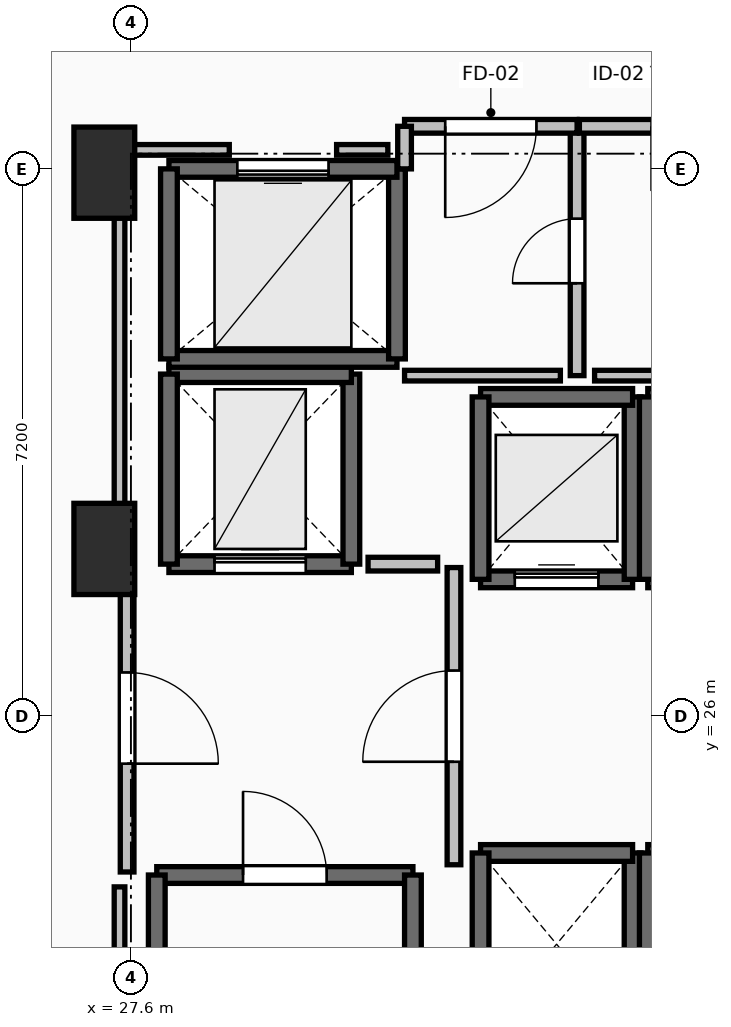
"""IFC4 building model, lengths in metres.
Left out: names, types, materials, properties, quantities, classifications, styles, units other than length and angle.
Written with IfcOpenShell. Run it as: python <this file> out.ifc"""

import sys

from ifc_helpers import new_model, si_unit, direction, frame, frame_2d, origin, origin_2d, place, context, subcontext, project, spatial, rectangle, extrude, element, fill, save


model = new_model("IFC4")
c1 = context("Model", 3, precision=1e-05, world=origin(), true_north=direction((0.0, 1.0)))
c2 = subcontext(c1, "Body", "Model", "MODEL_VIEW")
j1 = project(units=[si_unit("LENGTHUNIT", "METRE"), si_unit("PLANEANGLEUNIT", "RADIAN")], contexts=[c1])
p1 = place(None, origin())
s1 = spatial("IfcSite", under=j1, at=p1, CompositionType="ELEMENT")
p2 = place(p1, origin())
s2 = spatial("IfcBuilding", under=s1, at=p2, CompositionType="ELEMENT")
p3 = place(p2, frame((0.0, 0.0, 52.0)))
s3 = spatial("IfcBuildingStorey", under=s2, at=p3, CompositionType="ELEMENT", Elevation=52.0)
for number, where, z_axis, x_axis in (
    (1, (27.25, 28.2, 0.0), (0.0, 0.0, 1.0), (1.0, 0.0, 0.0)),
    (2, (27.25, 33.15, 0.0), (0.0, 0.0, 1.0), (1.0, 0.0, 0.0)),
):
    element("IfcColumn", number, at=place(p3, frame(where, z_axis=z_axis, x_axis=x_axis)), inside=s3, PredefinedType="PILASTER", context=c2, shape_type="SweptSolid", body=[
        extrude(rectangle(XDim=0.8, YDim=1.2, at=origin_2d()), origin(), (0.0, 0.0, 1.0), 3.5),
    ])
p4 = place(p3, frame((27.94, 23.91, 0.0), z_axis=(0.0, 0.0, 1.0), x_axis=(1.0, 0.0, 0.0)))
e3 = element("IfcWall", 3, at=p4, inside=s3, PredefinedType="SOLIDWALL", context=c2, shape_type="SweptSolid", body=[
    extrude(rectangle(XDim=3.37, YDim=0.22, at=frame_2d((1.685, 0.0))), origin(), (0.0, 0.0, 1.0), 3.24),
])
p5 = place(p4, frame((1.135, 0.0, 0.0)))
e4 = element("IfcOpeningElement", 4, at=p5, cuts=e3, PredefinedType="OPENING", context=c2, shape_type="SweptSolid", body=[
    extrude(rectangle(XDim=1.1, YDim=2.15, at=frame_2d((0.55, 1.075))), frame((0.0, 0.125, 0.0), z_axis=(0.0, -1.0, 0.0), x_axis=(1.0, 0.0, 0.0)), (0.0, 0.0, 1.0), 0.25),
])
for number, where, z_axis, x_axis in (
    (5, (31.31, 23.91, 0.0), (0.0, 0.0, 1.0), (0.0, -1.0, 0.0)),
    (6, (27.94, 16.49, 0.0), (0.0, 0.0, 1.0), (0.0, 1.0, 0.0)),
):
    element("IfcWall", number, at=place(p3, frame(where, z_axis=z_axis, x_axis=x_axis)), inside=s3, PredefinedType="SOLIDWALL", context=c2, shape_type="SweptSolid", body=[
        extrude(rectangle(XDim=7.42, YDim=0.22, at=frame_2d((3.71, 0.0))), origin(), (0.0, 0.0, 1.0), 3.24),
    ])
p6 = place(p3, frame((32.2, 27.8, 0.0), z_axis=(0.0, 0.0, 1.0), x_axis=(1.0, 0.0, 0.0)))
e7 = element("IfcWall", 7, at=p6, inside=s3, PredefinedType="SOLIDWALL", context=c2, shape_type="SweptSolid", body=[
    extrude(rectangle(XDim=2.0, YDim=0.22, at=frame_2d((1.0, 0.0))), origin(), (0.0, 0.0, 1.0), 3.24),
])
p7 = place(p6, frame((0.45, 0.0, 0.0)))
e8 = element("IfcOpeningElement", 8, at=p7, cuts=e7, PredefinedType="OPENING", context=c2, shape_type="SweptSolid", body=[
    extrude(rectangle(XDim=1.1, YDim=2.2, at=frame_2d((0.55, 1.1))), frame((0.0, 0.125, 0.0), z_axis=(0.0, -1.0, 0.0), x_axis=(1.0, 0.0, 0.0)), (0.0, 0.0, 1.0), 0.25),
])
p8 = place(p3, frame((34.2, 27.8, 0.0), z_axis=(0.0, 0.0, 1.0), x_axis=(0.0, 1.0, 0.0)))
e9 = element("IfcWall", 9, at=p8, inside=s3, PredefinedType="SOLIDWALL", context=c2, shape_type="SweptSolid", body=[
    extrude(rectangle(XDim=2.4, YDim=0.22, at=frame_2d((1.2, 0.0))), origin(), (0.0, 0.0, 1.0), 3.24),
])
p9 = place(p3, frame((34.2, 30.2, 0.0), z_axis=(0.0, 0.0, 1.0), x_axis=(-1.0, 0.0, 0.0)))
e10 = element("IfcWall", 10, at=p9, inside=s3, PredefinedType="SOLIDWALL", context=c2, shape_type="SweptSolid", body=[
    extrude(rectangle(XDim=2.0, YDim=0.22, at=frame_2d((1.0, 0.0))), origin(), (0.0, 0.0, 1.0), 3.24),
])
p10 = place(p3, frame((32.2, 30.2, 0.0), z_axis=(0.0, 0.0, 1.0), x_axis=(0.0, -1.0, 0.0)))
e11 = element("IfcWall", 11, at=p10, inside=s3, PredefinedType="SOLIDWALL", context=c2, shape_type="SweptSolid", body=[
    extrude(rectangle(XDim=2.4, YDim=0.22, at=frame_2d((1.2, 0.0))), origin(), (0.0, 0.0, 1.0), 3.24),
])
p11 = place(p3, frame((34.4, 27.8, 0.0), z_axis=(0.0, 0.0, 1.0), x_axis=(1.0, 0.0, 0.0)))
e12 = element("IfcWall", 12, at=p11, inside=s3, PredefinedType="SOLIDWALL", context=c2, shape_type="SweptSolid", body=[
    extrude(rectangle(XDim=2.0, YDim=0.22, at=frame_2d((1.0, 0.0))), origin(), (0.0, 0.0, 1.0), 3.24),
])
p12 = place(p11, frame((0.45, 0.0, 0.0)))
e13 = element("IfcOpeningElement", 13, at=p12, cuts=e12, PredefinedType="OPENING", context=c2, shape_type="SweptSolid", body=[
    extrude(rectangle(XDim=1.1, YDim=2.2, at=frame_2d((0.55, 1.1))), frame((0.0, 0.125, 0.0), z_axis=(0.0, -1.0, 0.0), x_axis=(1.0, 0.0, 0.0)), (0.0, 0.0, 1.0), 0.25),
])
p13 = place(p3, frame((36.4, 30.2, 0.0), z_axis=(0.0, 0.0, 1.0), x_axis=(-1.0, 0.0, 0.0)))
e14 = element("IfcWall", 14, at=p13, inside=s3, PredefinedType="SOLIDWALL", context=c2, shape_type="SweptSolid", body=[
    extrude(rectangle(XDim=2.0, YDim=0.22, at=frame_2d((1.0, 0.0))), origin(), (0.0, 0.0, 1.0), 3.24),
])
for number, where, z_axis, x_axis in (
    (15, (34.4, 30.2, 0.0), (0.0, 0.0, 1.0), (0.0, -1.0, 0.0)),
    (16, (34.2, 21.8, 0.0), (0.0, 0.0, 1.0), (0.0, 1.0, 0.0)),
):
    element("IfcWall", number, at=place(p3, frame(where, z_axis=z_axis, x_axis=x_axis)), inside=s3, PredefinedType="SOLIDWALL", context=c2, shape_type="SweptSolid", body=[
        extrude(rectangle(XDim=2.4, YDim=0.22, at=frame_2d((1.2, 0.0))), origin(), (0.0, 0.0, 1.0), 3.24),
    ])
p14 = place(p3, frame((34.2, 24.2, 0.0), z_axis=(0.0, 0.0, 1.0), x_axis=(-1.0, 0.0, 0.0)))
e17 = element("IfcWall", 17, at=p14, inside=s3, PredefinedType="SOLIDWALL", context=c2, shape_type="SweptSolid", body=[
    extrude(rectangle(XDim=2.0, YDim=0.22, at=frame_2d((1.0, 0.0))), origin(), (0.0, 0.0, 1.0), 3.24),
])
p15 = place(p3, frame((32.2, 24.2, 0.0), z_axis=(0.0, 0.0, 1.0), x_axis=(0.0, -1.0, 0.0)))
e18 = element("IfcWall", 18, at=p15, inside=s3, PredefinedType="SOLIDWALL", context=c2, shape_type="SweptSolid", body=[
    extrude(rectangle(XDim=2.4, YDim=0.22, at=frame_2d((1.2, 0.0))), origin(), (0.0, 0.0, 1.0), 3.24),
])
p16 = place(p3, frame((36.4, 24.2, 0.0), z_axis=(0.0, 0.0, 1.0), x_axis=(-1.0, 0.0, 0.0)))
e19 = element("IfcWall", 19, at=p16, inside=s3, PredefinedType="SOLIDWALL", context=c2, shape_type="SweptSolid", body=[
    extrude(rectangle(XDim=2.0, YDim=0.22, at=frame_2d((1.0, 0.0))), origin(), (0.0, 0.0, 1.0), 3.24),
])
p17 = place(p3, frame((34.4, 24.2, 0.0), z_axis=(0.0, 0.0, 1.0), x_axis=(0.0, -1.0, 0.0)))
e20 = element("IfcWall", 20, at=p17, inside=s3, PredefinedType="SOLIDWALL", context=c2, shape_type="SweptSolid", body=[
    extrude(rectangle(XDim=2.4, YDim=0.22, at=frame_2d((1.2, 0.0))), origin(), (0.0, 0.0, 1.0), 3.24),
])
p18 = place(p3, frame((28.1, 28.0, 0.0), z_axis=(0.0, 0.0, 1.0), x_axis=(1.0, 0.0, 0.0)))
e21 = element("IfcWall", 21, at=p18, inside=s3, PredefinedType="SHEAR", context=c2, shape_type="SweptSolid", body=[
    extrude(rectangle(XDim=2.4, YDim=0.22, at=frame_2d((1.2, 0.0))), origin(), (0.0, 0.0, 1.0), 3.24),
])
p19 = place(p18, frame((0.6, 0.0, 0.0)))
e22 = element("IfcOpeningElement", 22, at=p19, cuts=e21, PredefinedType="OPENING", context=c2, shape_type="SweptSolid", body=[
    extrude(rectangle(XDim=1.2, YDim=2.2, at=frame_2d((0.6, 1.1))), frame((0.0, 0.125, 0.0), z_axis=(0.0, -1.0, 0.0), x_axis=(1.0, 0.0, 0.0)), (0.0, 0.0, 1.0), 0.25),
])
p20 = place(p3, frame((30.5, 28.0, 0.0), z_axis=(0.0, 0.0, 1.0), x_axis=(0.0, 1.0, 0.0)))
e23 = element("IfcWall", 23, at=p20, inside=s3, PredefinedType="SHEAR", context=c2, shape_type="SweptSolid", body=[
    extrude(rectangle(XDim=2.5, YDim=0.22, at=frame_2d((1.25, 0.0))), origin(), (0.0, 0.0, 1.0), 3.24),
])
p21 = place(p3, frame((30.5, 30.5, 0.0), z_axis=(0.0, 0.0, 1.0), x_axis=(-1.0, 0.0, 0.0)))
e24 = element("IfcWall", 24, at=p21, inside=s3, PredefinedType="SHEAR", context=c2, shape_type="SweptSolid", body=[
    extrude(rectangle(XDim=2.4, YDim=0.22, at=frame_2d((1.2, 0.0))), origin(), (0.0, 0.0, 1.0), 3.24),
])
p22 = place(p3, frame((28.1, 30.5, 0.0), z_axis=(0.0, 0.0, 1.0), x_axis=(0.0, -1.0, 0.0)))
e25 = element("IfcWall", 25, at=p22, inside=s3, PredefinedType="SHEAR", context=c2, shape_type="SweptSolid", body=[
    extrude(rectangle(XDim=2.5, YDim=0.22, at=frame_2d((1.25, 0.0))), origin(), (0.0, 0.0, 1.0), 3.24),
])
p23 = place(p3, frame((28.1, 30.7, 0.0), z_axis=(0.0, 0.0, 1.0), x_axis=(1.0, 0.0, 0.0)))
e26 = element("IfcWall", 26, at=p23, inside=s3, PredefinedType="SOLIDWALL", context=c2, shape_type="SweptSolid", body=[
    extrude(rectangle(XDim=3.0, YDim=0.22, at=frame_2d((1.5, 0.0))), origin(), (0.0, 0.0, 1.0), 3.24),
])
p24 = place(p3, frame((31.1, 30.7, 0.0), z_axis=(0.0, 0.0, 1.0), x_axis=(0.0, 1.0, 0.0)))
e27 = element("IfcWall", 27, at=p24, inside=s3, PredefinedType="SOLIDWALL", context=c2, shape_type="SweptSolid", body=[
    extrude(rectangle(XDim=2.5, YDim=0.22, at=frame_2d((1.25, 0.0))), origin(), (0.0, 0.0, 1.0), 3.24),
])
p25 = place(p3, frame((31.1, 33.2, 0.0), z_axis=(0.0, 0.0, 1.0), x_axis=(-1.0, 0.0, 0.0)))
e28 = element("IfcWall", 28, at=p25, inside=s3, PredefinedType="SOLIDWALL", context=c2, shape_type="SweptSolid", body=[
    extrude(rectangle(XDim=3.0, YDim=0.22, at=frame_2d((1.5, 0.0))), origin(), (0.0, 0.0, 1.0), 3.24),
])
p26 = place(p25, frame((0.9, 0.0, 0.0)))
e29 = element("IfcOpeningElement", 29, at=p26, cuts=e28, PredefinedType="OPENING", context=c2, shape_type="SweptSolid", body=[
    extrude(rectangle(XDim=1.2, YDim=2.2, at=frame_2d((0.6, 1.1))), frame((0.0, 0.125, 0.0), z_axis=(0.0, -1.0, 0.0), x_axis=(1.0, 0.0, 0.0)), (0.0, 0.0, 1.0), 0.25),
])
p27 = place(p3, frame((28.1, 33.2, 0.0), z_axis=(0.0, 0.0, 1.0), x_axis=(0.0, -1.0, 0.0)))
e30 = element("IfcWall", 30, at=p27, inside=s3, PredefinedType="SOLIDWALL", context=c2, shape_type="SweptSolid", body=[
    extrude(rectangle(XDim=2.5, YDim=0.22, at=frame_2d((1.25, 0.0))), origin(), (0.0, 0.0, 1.0), 3.24),
])
p28 = place(p3, frame((31.85, 24.045, 0.0), z_axis=(0.0, 0.0, 1.0), x_axis=(0.0, 1.0, 0.0)))
e31 = element("IfcWall", 31, at=p28, inside=s3, PredefinedType="PARTITIONING", context=c2, shape_type="SweptSolid", body=[
    extrude(rectangle(XDim=3.91, YDim=0.18, at=frame_2d((1.955, 0.0))), origin(), (0.0, 0.0, 1.0), 3.24),
])
p29 = place(p28, frame((1.355, 0.0, 0.0)))
e32 = element("IfcOpeningElement", 32, at=p29, cuts=e31, PredefinedType="OPENING", context=c2, shape_type="SweptSolid", body=[
    extrude(rectangle(XDim=1.2, YDim=2.15, at=frame_2d((0.6, 1.075))), frame((0.0, 0.105, 0.0), z_axis=(0.0, -1.0, 0.0), x_axis=(1.0, 0.0, 0.0)), (0.0, 0.0, 1.0), 0.21),
])
p30 = place(p3, frame((27.55, 28.0, 0.0), z_axis=(0.0, 0.0, 1.0), x_axis=(0.0, -1.0, 0.0)))
e33 = element("IfcWall", 33, at=p30, inside=s3, PredefinedType="PARTITIONING", context=c2, shape_type="SweptSolid", body=[
    extrude(rectangle(XDim=4.05, YDim=0.18, at=frame_2d((2.025, 0.0))), origin(), (0.0, 0.0, 1.0), 3.24),
])
p31 = place(p30, frame((1.425, 0.0, 0.0)))
e34 = element("IfcOpeningElement", 34, at=p31, cuts=e33, PredefinedType="OPENING", context=c2, shape_type="SweptSolid", body=[
    extrude(rectangle(XDim=1.2, YDim=2.15, at=frame_2d((0.6, 1.075))), frame((0.0, 0.105, 0.0), z_axis=(0.0, -1.0, 0.0), x_axis=(1.0, 0.0, 0.0)), (0.0, 0.0, 1.0), 0.21),
])
p32 = place(p3, frame((33.47, 30.48, 0.0), z_axis=(0.0, 0.0, 1.0), x_axis=(0.0, 1.0, 0.0)))
e35 = element("IfcWall", 35, at=p32, inside=s3, PredefinedType="PARTITIONING", context=c2, shape_type="SweptSolid", body=[
    extrude(rectangle(XDim=3.28, YDim=0.18, at=frame_2d((1.64, 0.0))), origin(), (0.0, 0.0, 1.0), 3.24),
])
p33 = place(p32, frame((1.215, 0.0, 0.0)))
e36 = element("IfcOpeningElement", 36, at=p33, cuts=e35, PredefinedType="OPENING", context=c2, shape_type="SweptSolid", body=[
    extrude(rectangle(XDim=0.85, YDim=2.1, at=frame_2d((0.425, 1.05))), frame((0.0, 0.105, 0.0), z_axis=(0.0, -1.0, 0.0), x_axis=(1.0, 0.0, 0.0)), (0.0, 0.0, 1.0), 0.21),
])
p34 = place(p3, frame((33.47, 33.76, 0.0), z_axis=(0.0, 0.0, 1.0), x_axis=(-1.0, 0.0, 0.0)))
e37 = element("IfcWall", 37, at=p34, inside=s3, PredefinedType="PARTITIONING", context=c2, shape_type="SweptSolid", body=[
    extrude(rectangle(XDim=2.27, YDim=0.18, at=frame_2d((1.135, 0.0))), origin(), (0.0, 0.0, 1.0), 3.24),
])
p35 = place(p34, frame((0.535, 0.0, 0.0)))
e38 = element("IfcOpeningElement", 38, at=p35, cuts=e37, PredefinedType="OPENING", context=c2, shape_type="SweptSolid", body=[
    extrude(rectangle(XDim=1.2, YDim=2.15, at=frame_2d((0.6, 1.075))), frame((0.0, 0.105, 0.0), z_axis=(0.0, -1.0, 0.0), x_axis=(1.0, 0.0, 0.0)), (0.0, 0.0, 1.0), 0.21),
])
p36 = place(p3, frame((31.2, 33.76, 0.0), z_axis=(0.0, 0.0, 1.0), x_axis=(0.0, -1.0, 0.0)))
e39 = element("IfcWall", 39, at=p36, inside=s3, PredefinedType="PARTITIONING", context=c2, shape_type="SweptSolid", body=[
    extrude(rectangle(XDim=0.56, YDim=0.18, at=frame_2d((0.28, 0.0))), origin(), (0.0, 0.0, 1.0), 3.24),
])
p37 = place(p3, frame((36.25, 33.76, 0.0), z_axis=(0.0, 0.0, 1.0), x_axis=(-1.0, 0.0, 0.0)))
e40 = element("IfcWall", 40, at=p37, inside=s3, PredefinedType="PARTITIONING", context=c2, shape_type="SweptSolid", body=[
    extrude(rectangle(XDim=2.75, YDim=0.18, at=frame_2d((1.375, 0.0))), origin(), (0.0, 0.0, 1.0), 3.24),
])
p38 = place(p37, frame((0.95, 0.0, 0.0)))
e41 = element("IfcOpeningElement", 41, at=p38, cuts=e40, PredefinedType="OPENING", context=c2, shape_type="SweptSolid", body=[
    extrude(rectangle(XDim=0.85, YDim=2.1, at=frame_2d((0.425, 1.05))), frame((0.0, 0.105, 0.0), z_axis=(0.0, -1.0, 0.0), x_axis=(1.0, 0.0, 0.0)), (0.0, 0.0, 1.0), 0.21),
])
p39 = place(p3, frame((31.635, 28.0, 0.0), z_axis=(0.0, 0.0, 1.0), x_axis=(-1.0, 0.0, 0.0)))
e42 = element("IfcWall", 42, at=p39, inside=s3, PredefinedType="PARTITIONING", context=c2, shape_type="SweptSolid", body=[
    extrude(rectangle(XDim=0.915, YDim=0.18, at=frame_2d((0.458, 0.0))), origin(), (0.0, 0.0, 1.0), 3.24),
])
p40 = place(p3, frame((31.2, 30.48, 0.0), z_axis=(0.0, 0.0, 1.0), x_axis=(1.0, 0.0, 0.0)))
e43 = element("IfcWall", 43, at=p40, inside=s3, PredefinedType="PARTITIONING", context=c2, shape_type="SweptSolid", body=[
    extrude(rectangle(XDim=2.05, YDim=0.14, at=frame_2d((1.025, 0.0))), origin(), (0.0, 0.0, 1.0), 3.24),
])
p41 = place(p3, frame((33.7, 30.48, 0.0), z_axis=(0.0, 0.0, 1.0), x_axis=(1.0, 0.0, 0.0)))
e44 = element("IfcWall", 44, at=p41, inside=s3, PredefinedType="PARTITIONING", context=c2, shape_type="SweptSolid", body=[
    extrude(rectangle(XDim=2.33, YDim=0.14, at=frame_2d((1.165, 0.0))), origin(), (0.0, 0.0, 1.0), 2.432),
])
p42 = place(p3, frame((27.45, 16.24, 0.0), z_axis=(0.0, 0.0, 1.0), x_axis=(0.0, 1.0, 0.0)))
e45 = element("IfcWall", 45, at=p42, inside=s3, PredefinedType="PARTITIONING", context=c2, shape_type="SweptSolid", body=[
    extrude(rectangle(XDim=7.514, YDim=0.14, at=frame_2d((3.757, 0.0))), origin(), (0.0, 0.0, 1.0), 2.432),
])
p43 = place(p3, frame((27.45, 28.196, 0.0), z_axis=(0.0, 0.0, 1.0), x_axis=(0.0, 1.0, 0.0)))
e46 = element("IfcWall", 46, at=p43, inside=s3, PredefinedType="PARTITIONING", context=c2, shape_type="SweptSolid", body=[
    extrude(rectangle(XDim=5.254, YDim=0.14, at=frame_2d((2.627, 0.0))), origin(), (0.0, 0.0, 1.0), 2.432),
])
p44 = place(p3, frame((27.45, 33.45, 0.0), z_axis=(0.0, 0.0, 1.0), x_axis=(1.0, 0.0, 0.0)))
e47 = element("IfcWall", 47, at=p44, inside=s3, PredefinedType="PARTITIONING", context=c2, shape_type="SweptSolid", body=[
    extrude(rectangle(XDim=1.444, YDim=0.14, at=frame_2d((0.722, 0.0))), origin(), (0.0, 0.0, 1.0), 2.432),
])
p45 = place(p3, frame((30.306, 33.45, 0.0), z_axis=(0.0, 0.0, 1.0), x_axis=(1.0, 0.0, 0.0)))
e48 = element("IfcWall", 48, at=p45, inside=s3, PredefinedType="PARTITIONING", context=c2, shape_type="SweptSolid", body=[
    extrude(rectangle(XDim=0.674, YDim=0.14, at=frame_2d((0.337, 0.0))), origin(), (0.0, 0.0, 1.0), 3.24),
])
p46 = place(p5, origin())
e49 = element("IfcDoor", 49, at=p46, inside=s3, OperationType="SINGLE_SWING_LEFT", PredefinedType="DOOR", context=c2, shape_type="SweptSolid", body=[
    extrude(rectangle(XDim=1.1, YDim=2.15, at=frame_2d((0.55, 1.075))), frame((0.0, 0.025, 0.0), z_axis=(0.0, -1.0, 0.0), x_axis=(1.0, 0.0, 0.0)), (0.0, 0.0, 1.0), 0.05),
])
fill(e4, e49)
p47 = place(p7, origin())
e50 = element("IfcDoor", 50, at=p47, inside=s3, OperationType="SLIDING_TO_LEFT", PredefinedType="DOOR", context=c2, shape_type="SweptSolid", body=[
    extrude(rectangle(XDim=1.1, YDim=2.2, at=frame_2d((0.55, 1.1))), frame((0.0, 0.025, 0.0), z_axis=(0.0, -1.0, 0.0), x_axis=(1.0, 0.0, 0.0)), (0.0, 0.0, 1.0), 0.05),
])
fill(e8, e50)
p48 = place(p19, origin())
e51 = element("IfcDoor", 51, at=p48, inside=s3, OperationType="SLIDING_TO_LEFT", PredefinedType="DOOR", context=c2, shape_type="SweptSolid", body=[
    extrude(rectangle(XDim=1.2, YDim=2.2, at=frame_2d((0.6, 1.1))), frame((0.0, 0.025, 0.0), z_axis=(0.0, -1.0, 0.0), x_axis=(1.0, 0.0, 0.0)), (0.0, 0.0, 1.0), 0.05),
])
fill(e22, e51)
p49 = place(p26, origin())
e52 = element("IfcDoor", 52, at=p49, inside=s3, OperationType="SLIDING_TO_LEFT", PredefinedType="DOOR", context=c2, shape_type="SweptSolid", body=[
    extrude(rectangle(XDim=1.2, YDim=2.2, at=frame_2d((0.6, 1.1))), frame((0.0, 0.025, 0.0), z_axis=(0.0, -1.0, 0.0), x_axis=(1.0, 0.0, 0.0)), (0.0, 0.0, 1.0), 0.05),
])
fill(e29, e52)
p50 = place(p29, origin())
e53 = element("IfcDoor", 53, at=p50, inside=s3, OperationType="SINGLE_SWING_LEFT", PredefinedType="DOOR", context=c2, shape_type="SweptSolid", body=[
    extrude(rectangle(XDim=1.2, YDim=2.15, at=frame_2d((0.6, 1.075))), frame((0.0, 0.025, 0.0), z_axis=(0.0, -1.0, 0.0), x_axis=(1.0, 0.0, 0.0)), (0.0, 0.0, 1.0), 0.05),
])
fill(e32, e53)
p51 = place(p31, origin())
e54 = element("IfcDoor", 54, at=p51, inside=s3, OperationType="SINGLE_SWING_RIGHT", PredefinedType="DOOR", context=c2, shape_type="SweptSolid", body=[
    extrude(rectangle(XDim=1.2, YDim=2.15, at=frame_2d((0.6, 1.075))), frame((0.0, 0.025, 0.0), z_axis=(0.0, -1.0, 0.0), x_axis=(1.0, 0.0, 0.0)), (0.0, 0.0, 1.0), 0.05),
])
fill(e34, e54)
p52 = place(p33, origin())
e55 = element("IfcDoor", 55, at=p52, inside=s3, OperationType="SINGLE_SWING_LEFT", PredefinedType="DOOR", context=c2, shape_type="SweptSolid", body=[
    extrude(rectangle(XDim=0.85, YDim=2.1, at=frame_2d((0.425, 1.05))), frame((0.0, 0.025, 0.0), z_axis=(0.0, -1.0, 0.0), x_axis=(1.0, 0.0, 0.0)), (0.0, 0.0, 1.0), 0.05),
])
fill(e36, e55)
p53 = place(p35, origin())
e56 = element("IfcDoor", 56, at=p53, inside=s3, OperationType="SINGLE_SWING_RIGHT", PredefinedType="DOOR", context=c2, shape_type="SweptSolid", body=[
    extrude(rectangle(XDim=1.2, YDim=2.15, at=frame_2d((0.6, 1.075))), frame((0.0, 0.025, 0.0), z_axis=(0.0, -1.0, 0.0), x_axis=(1.0, 0.0, 0.0)), (0.0, 0.0, 1.0), 0.05),
])
fill(e38, e56)
save(model, sys.argv[1])
